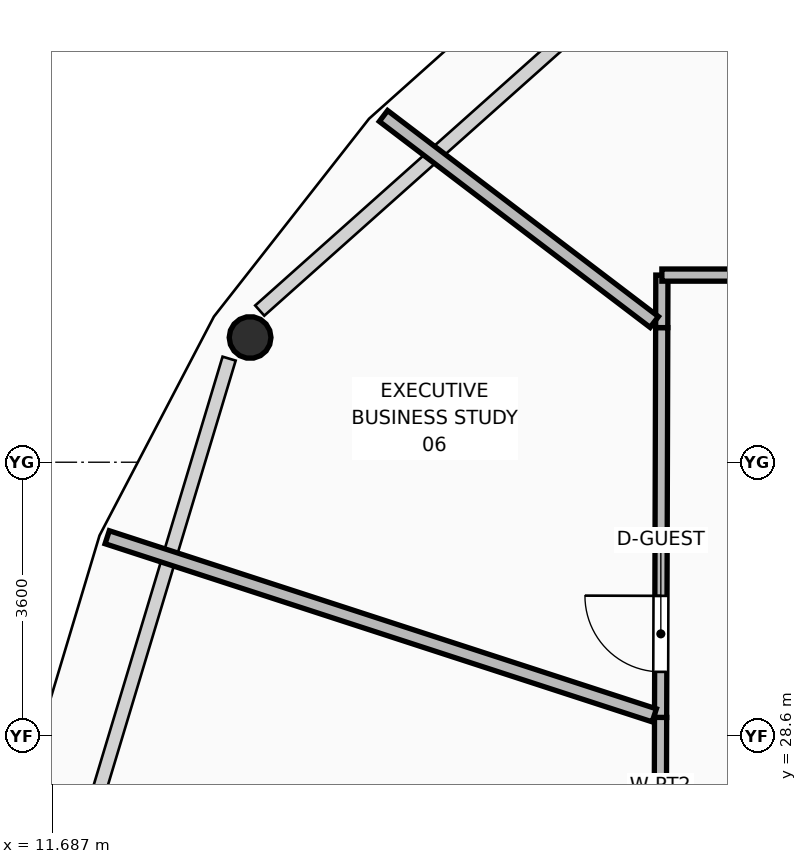
"""IFC4 building model, lengths in metres.
Left out: names, types, materials, properties, quantities, classifications, styles, units other than length and angle.
Written with IfcOpenShell. Run it as: python <this file> out.ifc"""

import sys

from ifc_helpers import new_model, si_unit, direction, frame, frame_2d, origin, origin_2d, place, context, subcontext, project, spatial, rectangle, hollow_circle, extrude, element, fill, save


model = new_model("IFC4")
c1 = context("Model", 3, precision=1e-05, world=origin(), true_north=direction((0.0, 1.0)))
c2 = subcontext(c1, "Body", "Model", "MODEL_VIEW")
j1 = project(units=[si_unit("LENGTHUNIT", "METRE"), si_unit("PLANEANGLEUNIT", "RADIAN")], contexts=[c1])
p1 = place(None, origin())
s1 = spatial("IfcSite", under=j1, at=p1, CompositionType="ELEMENT")
p2 = place(p1, origin())
s2 = spatial("IfcBuilding", under=s1, at=p2, CompositionType="ELEMENT")
p3 = place(p2, frame((0.0, 0.0, 263.85)))
s3 = spatial("IfcBuildingStorey", under=s2, at=p3, CompositionType="ELEMENT", Elevation=263.85)
p4 = place(p3, frame((14.292, 33.841, 0.0), z_axis=(0.018549661596, -0.009700883096, 0.999780877454), x_axis=(0.463421877407, 0.886137779096, 0.0)))
e1 = element("IfcColumn", 1, at=p4, inside=s3, PredefinedType="COLUMN", context=c2, shape_type="SweptSolid", body=[
    extrude(hollow_circle(Radius=0.275, WallThickness=0.025, at=origin_2d()), origin(), (0.0, 0.0, 1.0), 3.725),
])
p5 = place(p3, frame((19.686, 26.142, 0.0), z_axis=(0.0, 0.0, 1.0), x_axis=(0.002621341441, 0.999996564279, 0.0)))
e2 = element("IfcWall", 2, at=p5, inside=s3, PredefinedType="PARTITIONING", context=c2, shape_type="SweptSolid", body=[
    extrude(rectangle(XDim=2.701, YDim=0.16, at=frame_2d((1.351, 0.0))), origin(), (0.0, 0.0, 1.0), 3.55),
])
p6 = place(p3, frame((19.693, 28.843, 0.0), z_axis=(0.0, 0.0, 1.0), x_axis=(0.002904196475, 0.999995782813, 0.0)))
e3 = element("IfcWall", 3, at=p6, inside=s3, PredefinedType="PARTITIONING", context=c2, shape_type="SweptSolid", body=[
    extrude(rectangle(XDim=5.128, YDim=0.16, at=frame_2d((2.564, 0.0))), origin(), (0.0, 0.0, 1.0), 3.092),
])
p7 = place(p6, frame((0.599, 0.0, 0.0)))
e4 = element("IfcOpeningElement", 4, at=p7, cuts=e3, PredefinedType="OPENING", context=c2, shape_type="SweptSolid", body=[
    extrude(rectangle(XDim=1.0, YDim=2.1, at=frame_2d((0.5, 1.05))), frame((0.0, 0.09, 0.0), z_axis=(0.0, -1.0, 0.0), x_axis=(1.0, 0.0, 0.0)), (0.0, 0.0, 1.0), 0.18),
])
p8 = place(p3, frame((19.708, 33.971, 0.0), z_axis=(0.0, 0.0, 1.0), x_axis=(0.002825845305, 0.999996007291, 0.0)))
e5 = element("IfcWall", 5, at=p8, inside=s3, PredefinedType="PARTITIONING", context=c2, shape_type="SweptSolid", body=[
    extrude(rectangle(XDim=0.691, YDim=0.16, at=frame_2d((0.346, 0.0))), origin(), (0.0, 0.0, 1.0), 3.55),
])
p9 = place(p3, frame((19.71, 34.662, 0.0), z_axis=(0.0, 0.0, 1.0), x_axis=(0.999999983716, -0.000180466322, 0.0)))
e6 = element("IfcWall", 6, at=p9, inside=s3, PredefinedType="PARTITIONING", context=c2, shape_type="SweptSolid", body=[
    extrude(rectangle(XDim=6.764, YDim=0.16, at=frame_2d((3.382, 0.0))), origin(), (0.0, 0.0, 1.0), 3.092),
])
p10 = place(p9, frame((4.805, 0.0, 0.0)))
e7 = element("IfcOpeningElement", 7, at=p10, cuts=e6, PredefinedType="OPENING", context=c2, shape_type="SweptSolid", body=[
    extrude(rectangle(XDim=1.2, YDim=2.1, at=frame_2d((0.6, 1.05))), frame((0.0, 0.09, 0.0), z_axis=(0.0, -1.0, 0.0), x_axis=(1.0, 0.0, 0.0)), (0.0, 0.0, 1.0), 0.18),
])
p11 = place(p3, frame((19.61, 34.045, 0.0), z_axis=(0.0, 0.0, 1.0), x_axis=(-0.795937236287, 0.605379150526, 0.0)))
e8 = element("IfcWall", 8, at=p11, inside=s3, PredefinedType="PARTITIONING", context=c2, shape_type="SweptSolid", body=[
    extrude(rectangle(XDim=4.477, YDim=0.18, at=frame_2d((2.238, 0.0))), origin(), (0.0, 0.0, 1.0), 2.963),
])
p12 = place(p3, frame((19.61, 28.87, 0.0), z_axis=(0.0, 0.0, 1.0), x_axis=(-0.950901014296, 0.309495171224, 0.0)))
e9 = element("IfcWall", 9, at=p12, inside=s3, PredefinedType="PARTITIONING", context=c2, shape_type="SweptSolid", body=[
    extrude(rectangle(XDim=7.57, YDim=0.18, at=frame_2d((3.785, 0.0))), origin(), (0.0, 0.0, 1.0), 2.963),
])
p13 = place(p7, origin())
e10 = element("IfcDoor", 10, at=p13, inside=s3, OperationType="SINGLE_SWING_RIGHT", PredefinedType="DOOR", context=c2, shape_type="SweptSolid", body=[
    extrude(rectangle(XDim=1.0, YDim=2.1, at=frame_2d((0.5, 1.05))), frame((0.0, 0.025, 0.0), z_axis=(0.0, -1.0, 0.0), x_axis=(1.0, 0.0, 0.0)), (0.0, 0.0, 1.0), 0.05),
])
fill(e4, e10)
save(model, sys.argv[1])
